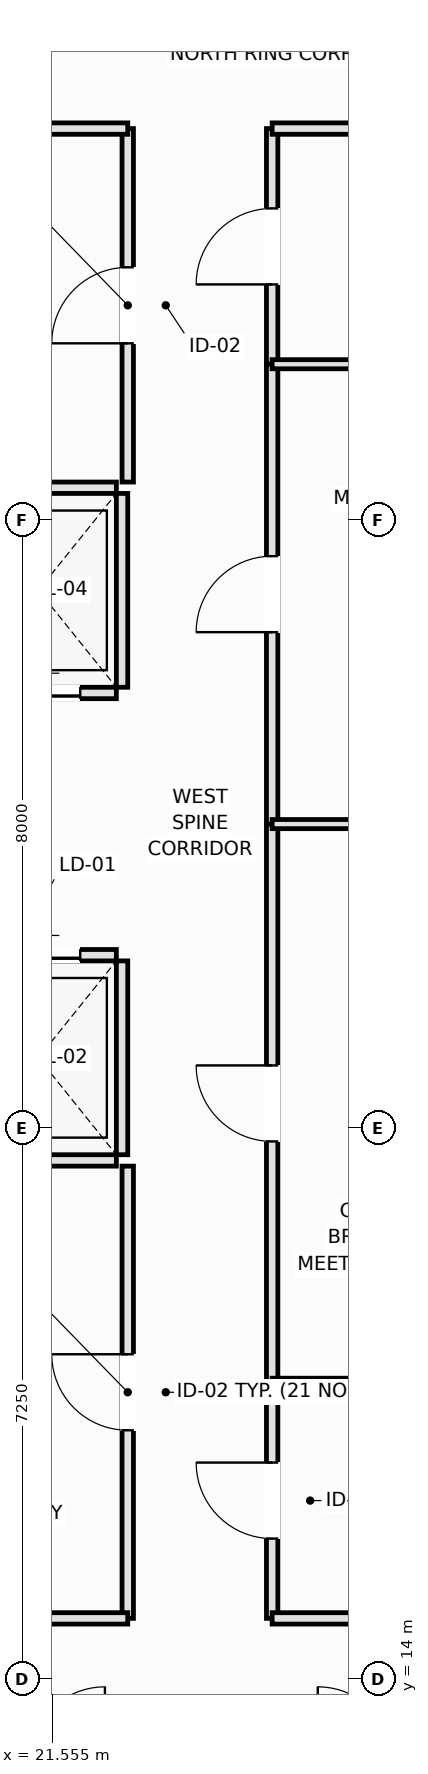
"""IFC4 building model, lengths in metres.
Left out: names, types, materials, properties, quantities, classifications, styles, units other than length and angle.
Written with IfcOpenShell. Run it as: python <this file> out.ifc"""

import sys

from ifc_helpers import new_model, si_unit, direction, frame, frame_2d, origin, place, context, subcontext, project, spatial, rectangle, extrude, element, fill, save


model = new_model("IFC4")
c1 = context("Model", 3, precision=1e-05, world=origin(), true_north=direction((0.0, 1.0)))
c2 = subcontext(c1, "Body", "Model", "MODEL_VIEW")
j1 = project(units=[si_unit("LENGTHUNIT", "METRE"), si_unit("PLANEANGLEUNIT", "RADIAN")], contexts=[c1])
p1 = place(None, origin())
s1 = spatial("IfcSite", under=j1, at=p1, CompositionType="ELEMENT")
p2 = place(p1, origin())
s2 = spatial("IfcBuilding", under=s1, at=p2, CompositionType="ELEMENT")
p3 = place(p2, frame((0.0, 0.0, 82.4)))
s3 = spatial("IfcBuildingStorey", under=s2, at=p3, CompositionType="ELEMENT", Elevation=82.4)
p4 = place(p3, frame((20.35, 20.825, 0.0), z_axis=(0.0, 0.0, 1.0), x_axis=(1.0, 0.0, 0.0)))
e1 = element("IfcWall", 1, at=p4, inside=s3, PredefinedType="PARTITIONING", context=c2, shape_type="SweptSolid", body=[
    extrude(rectangle(XDim=2.05, YDim=0.15, at=frame_2d((1.025, 0.0))), origin(), (0.0, 0.0, 1.0), 3.37),
])
p5 = place(p3, frame((20.35, 23.525, 0.0), z_axis=(0.0, 0.0, 1.0), x_axis=(1.0, 0.0, 0.0)))
e2 = element("IfcWall", 2, at=p5, inside=s3, PredefinedType="PARTITIONING", context=c2, shape_type="SweptSolid", body=[
    extrude(rectangle(XDim=2.05, YDim=0.15, at=frame_2d((1.025, 0.0))), origin(), (0.0, 0.0, 1.0), 3.37),
])
p6 = place(p5, frame((0.475, 0.0, 0.0)))
e3 = element("IfcOpeningElement", 3, at=p6, cuts=e2, PredefinedType="OPENING", context=c2, shape_type="SweptSolid", body=[
    extrude(rectangle(XDim=1.1, YDim=2.2, at=frame_2d((0.55, 1.1))), frame((0.0, 0.085, 0.0), z_axis=(0.0, -1.0, 0.0), x_axis=(1.0, 0.0, 0.0)), (0.0, 0.0, 1.0), 0.17),
])
p7 = place(p3, frame((22.475, 20.9, 0.0), z_axis=(0.0, 0.0, 1.0), x_axis=(0.0, 1.0, 0.0)))
e4 = element("IfcWall", 4, at=p7, inside=s3, PredefinedType="PARTITIONING", context=c2, shape_type="SweptSolid", body=[
    extrude(rectangle(XDim=2.55, YDim=0.15, at=frame_2d((1.275, 0.0))), origin(), (0.0, 0.0, 1.0), 3.37),
])
p8 = place(p3, frame((20.35, 26.975, 0.0), z_axis=(0.0, 0.0, 1.0), x_axis=(1.0, 0.0, 0.0)))
e5 = element("IfcWall", 5, at=p8, inside=s3, PredefinedType="PARTITIONING", context=c2, shape_type="SweptSolid", body=[
    extrude(rectangle(XDim=2.05, YDim=0.15, at=frame_2d((1.025, 0.0))), origin(), (0.0, 0.0, 1.0), 3.37),
])
p9 = place(p8, frame((0.475, 0.0, 0.0)))
e6 = element("IfcOpeningElement", 6, at=p9, cuts=e5, PredefinedType="OPENING", context=c2, shape_type="SweptSolid", body=[
    extrude(rectangle(XDim=1.1, YDim=2.2, at=frame_2d((0.55, 1.1))), frame((0.0, 0.085, 0.0), z_axis=(0.0, -1.0, 0.0), x_axis=(1.0, 0.0, 0.0)), (0.0, 0.0, 1.0), 0.17),
])
p10 = place(p3, frame((20.35, 29.675, 0.0), z_axis=(0.0, 0.0, 1.0), x_axis=(1.0, 0.0, 0.0)))
e7 = element("IfcWall", 7, at=p10, inside=s3, PredefinedType="PARTITIONING", context=c2, shape_type="SweptSolid", body=[
    extrude(rectangle(XDim=2.05, YDim=0.15, at=frame_2d((1.025, 0.0))), origin(), (0.0, 0.0, 1.0), 3.37),
])
p11 = place(p3, frame((22.475, 27.05, 0.0), z_axis=(0.0, 0.0, 1.0), x_axis=(0.0, 1.0, 0.0)))
e8 = element("IfcWall", 8, at=p11, inside=s3, PredefinedType="PARTITIONING", context=c2, shape_type="SweptSolid", body=[
    extrude(rectangle(XDim=2.55, YDim=0.15, at=frame_2d((1.275, 0.0))), origin(), (0.0, 0.0, 1.0), 3.37),
])
p12 = place(p3, frame((22.55, 14.8, 0.0), z_axis=(0.0, 0.0, 1.0), x_axis=(0.0, 1.0, 0.0)))
e9 = element("IfcWall", 9, at=p12, inside=s3, PredefinedType="PARTITIONING", context=c2, shape_type="SweptSolid", body=[
    extrude(rectangle(XDim=5.95, YDim=0.15, at=frame_2d((2.975, 0.0))), origin(), (0.0, 0.0, 1.0), 3.01),
])
p13 = place(p12, frame((2.475, 0.0, 0.0)))
e10 = element("IfcOpeningElement", 10, at=p13, cuts=e9, PredefinedType="OPENING", context=c2, shape_type="SweptSolid", body=[
    extrude(rectangle(XDim=1.0, YDim=2.15, at=frame_2d((0.5, 1.075))), frame((0.0, 0.085, 0.0), z_axis=(0.0, -1.0, 0.0), x_axis=(1.0, 0.0, 0.0)), (0.0, 0.0, 1.0), 0.17),
])
p14 = place(p3, frame((22.55, 29.75, 0.0), z_axis=(0.0, 0.0, 1.0), x_axis=(0.0, 1.0, 0.0)))
e11 = element("IfcWall", 11, at=p14, inside=s3, PredefinedType="PARTITIONING", context=c2, shape_type="SweptSolid", body=[
    extrude(rectangle(XDim=4.65, YDim=0.15, at=frame_2d((2.325, 0.0))), origin(), (0.0, 0.0, 1.0), 3.01),
])
p15 = place(p14, frame((1.825, 0.0, 0.0)))
e12 = element("IfcOpeningElement", 12, at=p15, cuts=e11, PredefinedType="OPENING", context=c2, shape_type="SweptSolid", body=[
    extrude(rectangle(XDim=1.0, YDim=2.15, at=frame_2d((0.5, 1.075))), frame((0.0, 0.085, 0.0), z_axis=(0.0, -1.0, 0.0), x_axis=(1.0, 0.0, 0.0)), (0.0, 0.0, 1.0), 0.17),
])
p16 = place(p3, frame((24.45, 14.8, 0.0), z_axis=(0.0, 0.0, 1.0), x_axis=(0.0, 1.0, 0.0)))
e13 = element("IfcWall", 13, at=p16, inside=s3, PredefinedType="PARTITIONING", context=c2, shape_type="SweptSolid", body=[
    extrude(rectangle(XDim=3.1, YDim=0.15, at=frame_2d((1.55, 0.0))), origin(), (0.0, 0.0, 1.0), 3.37),
])
p17 = place(p16, frame((1.05, 0.0, 0.0)))
e14 = element("IfcOpeningElement", 14, at=p17, cuts=e13, PredefinedType="OPENING", context=c2, shape_type="SweptSolid", body=[
    extrude(rectangle(XDim=1.0, YDim=2.15, at=frame_2d((0.5, 1.075))), frame((0.0, 0.085, 0.0), z_axis=(0.0, -1.0, 0.0), x_axis=(1.0, 0.0, 0.0)), (0.0, 0.0, 1.0), 0.17),
])
p18 = place(p3, frame((24.45, 31.3, 0.0), z_axis=(0.0, 0.0, 1.0), x_axis=(0.0, 1.0, 0.0)))
e15 = element("IfcWall", 15, at=p18, inside=s3, PredefinedType="PARTITIONING", context=c2, shape_type="SweptSolid", body=[
    extrude(rectangle(XDim=3.1, YDim=0.15, at=frame_2d((1.55, 0.0))), origin(), (0.0, 0.0, 1.0), 3.37),
])
p19 = place(p18, frame((1.05, 0.0, 0.0)))
e16 = element("IfcOpeningElement", 16, at=p19, cuts=e15, PredefinedType="OPENING", context=c2, shape_type="SweptSolid", body=[
    extrude(rectangle(XDim=1.0, YDim=2.15, at=frame_2d((0.5, 1.075))), frame((0.0, 0.085, 0.0), z_axis=(0.0, -1.0, 0.0), x_axis=(1.0, 0.0, 0.0)), (0.0, 0.0, 1.0), 0.17),
])
p20 = place(p3, frame((24.45, 17.9, 0.0), z_axis=(0.0, 0.0, 1.0), x_axis=(0.0, 1.0, 0.0)))
e17 = element("IfcWall", 17, at=p20, inside=s3, PredefinedType="PARTITIONING", context=c2, shape_type="SweptSolid", body=[
    extrude(rectangle(XDim=7.35, YDim=0.15, at=frame_2d((3.675, 0.0))), origin(), (0.0, 0.0, 1.0), 3.37),
])
p21 = place(p20, frame((3.175, 0.0, 0.0)))
e18 = element("IfcOpeningElement", 18, at=p21, cuts=e17, PredefinedType="OPENING", context=c2, shape_type="SweptSolid", body=[
    extrude(rectangle(XDim=1.0, YDim=2.15, at=frame_2d((0.5, 1.075))), frame((0.0, 0.085, 0.0), z_axis=(0.0, -1.0, 0.0), x_axis=(1.0, 0.0, 0.0)), (0.0, 0.0, 1.0), 0.17),
])
p22 = place(p3, frame((24.45, 25.25, 0.0), z_axis=(0.0, 0.0, 1.0), x_axis=(0.0, 1.0, 0.0)))
e19 = element("IfcWall", 19, at=p22, inside=s3, PredefinedType="PARTITIONING", context=c2, shape_type="SweptSolid", body=[
    extrude(rectangle(XDim=6.05, YDim=0.15, at=frame_2d((3.025, 0.0))), origin(), (0.0, 0.0, 1.0), 3.37),
])
p23 = place(p22, frame((2.525, 0.0, 0.0)))
e20 = element("IfcOpeningElement", 20, at=p23, cuts=e19, PredefinedType="OPENING", context=c2, shape_type="SweptSolid", body=[
    extrude(rectangle(XDim=1.0, YDim=2.15, at=frame_2d((0.5, 1.075))), frame((0.0, 0.085, 0.0), z_axis=(0.0, -1.0, 0.0), x_axis=(1.0, 0.0, 0.0)), (0.0, 0.0, 1.0), 0.17),
])
p24 = place(p3, frame((19.9, 14.8, 0.0), z_axis=(0.0, 0.0, 1.0), x_axis=(1.0, 0.0, 0.0)))
e21 = element("IfcWall", 21, at=p24, inside=s3, PredefinedType="PARTITIONING", context=c2, shape_type="SweptSolid", body=[
    extrude(rectangle(XDim=2.65, YDim=0.15, at=frame_2d((1.325, 0.0))), origin(), (0.0, 0.0, 1.0), 3.37),
])
p25 = place(p3, frame((24.45, 14.8, 0.0), z_axis=(0.0, 0.0, 1.0), x_axis=(1.0, 0.0, 0.0)))
e22 = element("IfcWall", 22, at=p25, inside=s3, PredefinedType="PARTITIONING", context=c2, shape_type="SweptSolid", body=[
    extrude(rectangle(XDim=6.35, YDim=0.15, at=frame_2d((3.175, 0.0))), origin(), (0.0, 0.0, 1.0), 3.37),
])
p26 = place(p3, frame((19.9, 34.4, 0.0), z_axis=(0.0, 0.0, 1.0), x_axis=(1.0, 0.0, 0.0)))
e23 = element("IfcWall", 23, at=p26, inside=s3, PredefinedType="PARTITIONING", context=c2, shape_type="SweptSolid", body=[
    extrude(rectangle(XDim=2.65, YDim=0.15, at=frame_2d((1.325, 0.0))), origin(), (0.0, 0.0, 1.0), 3.37),
])
p27 = place(p3, frame((24.45, 34.4, 0.0), z_axis=(0.0, 0.0, 1.0), x_axis=(1.0, 0.0, 0.0)))
e24 = element("IfcWall", 24, at=p27, inside=s3, PredefinedType="PARTITIONING", context=c2, shape_type="SweptSolid", body=[
    extrude(rectangle(XDim=6.35, YDim=0.15, at=frame_2d((3.175, 0.0))), origin(), (0.0, 0.0, 1.0), 3.37),
])
for number, where, z_axis, x_axis in (
    (25, (24.45, 17.9, 0.0), (0.0, 0.0, 1.0), (1.0, 0.0, 0.0)),
    (26, (24.45, 31.3, 0.0), (0.0, 0.0, 1.0), (1.0, 0.0, 0.0)),
):
    element("IfcWall", number, at=place(p3, frame(where, z_axis=z_axis, x_axis=x_axis)), inside=s3, PredefinedType="PARTITIONING", context=c2, shape_type="SweptSolid", body=[
        extrude(rectangle(XDim=3.05, YDim=0.12, at=frame_2d((1.525, 0.0))), origin(), (0.0, 0.0, 1.0), 3.37),
    ])
p28 = place(p3, frame((24.45, 25.25, 0.0), z_axis=(0.0, 0.0, 1.0), x_axis=(1.0, 0.0, 0.0)))
e27 = element("IfcWall", 27, at=p28, inside=s3, PredefinedType="PARTITIONING", context=c2, shape_type="SweptSolid", body=[
    extrude(rectangle(XDim=3.05, YDim=0.12, at=frame_2d((1.525, 0.0))), origin(), (0.0, 0.0, 1.0), 2.72),
])
p29 = place(p6, origin())
e28 = element("IfcDoor", 28, at=p29, inside=s3, OperationType="DOUBLE_DOOR_SLIDING", PredefinedType="DOOR", context=c2, shape_type="SweptSolid", body=[
    extrude(rectangle(XDim=1.1, YDim=2.2, at=frame_2d((0.55, 1.1))), frame((0.0, 0.025, 0.0), z_axis=(0.0, -1.0, 0.0), x_axis=(1.0, 0.0, 0.0)), (0.0, 0.0, 1.0), 0.05),
])
fill(e3, e28)
p30 = place(p9, origin())
e29 = element("IfcDoor", 29, at=p30, inside=s3, OperationType="DOUBLE_DOOR_SLIDING", PredefinedType="DOOR", context=c2, shape_type="SweptSolid", body=[
    extrude(rectangle(XDim=1.1, YDim=2.2, at=frame_2d((0.55, 1.1))), frame((0.0, 0.025, 0.0), z_axis=(0.0, -1.0, 0.0), x_axis=(1.0, 0.0, 0.0)), (0.0, 0.0, 1.0), 0.05),
])
fill(e6, e29)
p31 = place(p13, origin())
e30 = element("IfcDoor", 30, at=p31, inside=s3, OperationType="SINGLE_SWING_RIGHT", PredefinedType="DOOR", context=c2, shape_type="SweptSolid", body=[
    extrude(rectangle(XDim=1.0, YDim=2.15, at=frame_2d((0.5, 1.075))), frame((0.0, 0.025, 0.0), z_axis=(0.0, -1.0, 0.0), x_axis=(1.0, 0.0, 0.0)), (0.0, 0.0, 1.0), 0.05),
])
fill(e10, e30)
p32 = place(p15, origin())
e31 = element("IfcDoor", 31, at=p32, inside=s3, OperationType="SINGLE_SWING_LEFT", PredefinedType="DOOR", context=c2, shape_type="SweptSolid", body=[
    extrude(rectangle(XDim=1.0, YDim=2.15, at=frame_2d((0.5, 1.075))), frame((0.0, 0.025, 0.0), z_axis=(0.0, -1.0, 0.0), x_axis=(1.0, 0.0, 0.0)), (0.0, 0.0, 1.0), 0.05),
])
fill(e12, e31)
p33 = place(p17, origin())
e32 = element("IfcDoor", 32, at=p33, inside=s3, OperationType="SINGLE_SWING_RIGHT", PredefinedType="DOOR", context=c2, shape_type="SweptSolid", body=[
    extrude(rectangle(XDim=1.0, YDim=2.15, at=frame_2d((0.5, 1.075))), frame((0.0, 0.025, 0.0), z_axis=(0.0, -1.0, 0.0), x_axis=(1.0, 0.0, 0.0)), (0.0, 0.0, 1.0), 0.05),
])
fill(e14, e32)
p34 = place(p19, origin())
e33 = element("IfcDoor", 33, at=p34, inside=s3, OperationType="SINGLE_SWING_LEFT", PredefinedType="DOOR", context=c2, shape_type="SweptSolid", body=[
    extrude(rectangle(XDim=1.0, YDim=2.15, at=frame_2d((0.5, 1.075))), frame((0.0, 0.025, 0.0), z_axis=(0.0, -1.0, 0.0), x_axis=(1.0, 0.0, 0.0)), (0.0, 0.0, 1.0), 0.05),
])
fill(e16, e33)
p35 = place(p21, origin())
e34 = element("IfcDoor", 34, at=p35, inside=s3, OperationType="SINGLE_SWING_RIGHT", PredefinedType="DOOR", context=c2, shape_type="SweptSolid", body=[
    extrude(rectangle(XDim=1.0, YDim=2.15, at=frame_2d((0.5, 1.075))), frame((0.0, 0.025, 0.0), z_axis=(0.0, -1.0, 0.0), x_axis=(1.0, 0.0, 0.0)), (0.0, 0.0, 1.0), 0.05),
])
fill(e18, e34)
p36 = place(p23, origin())
e35 = element("IfcDoor", 35, at=p36, inside=s3, OperationType="SINGLE_SWING_LEFT", PredefinedType="DOOR", context=c2, shape_type="SweptSolid", body=[
    extrude(rectangle(XDim=1.0, YDim=2.15, at=frame_2d((0.5, 1.075))), frame((0.0, 0.025, 0.0), z_axis=(0.0, -1.0, 0.0), x_axis=(1.0, 0.0, 0.0)), (0.0, 0.0, 1.0), 0.05),
])
fill(e20, e35)
save(model, sys.argv[1])
